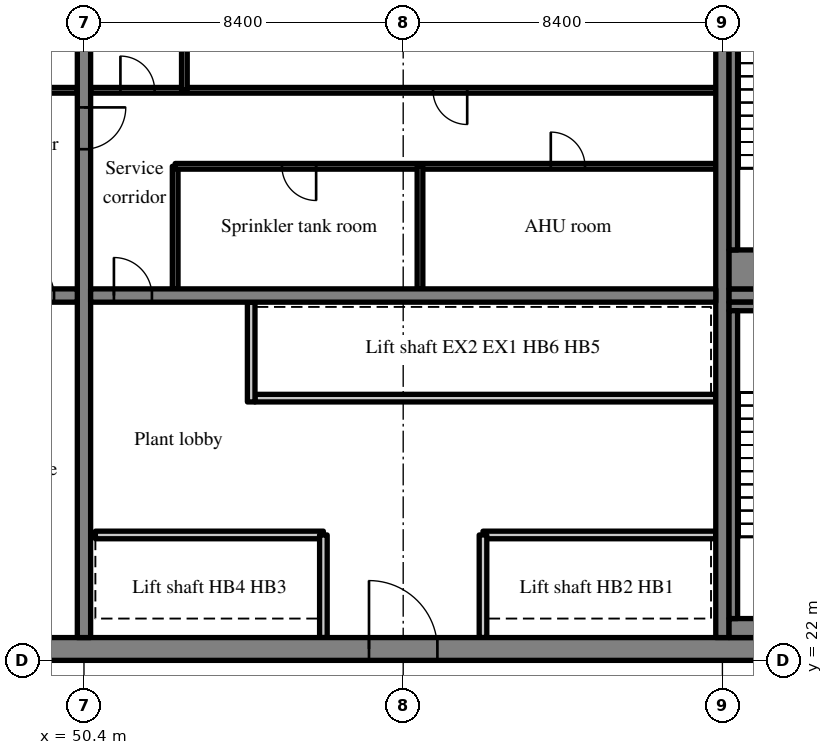
"""IFC4 building model, lengths in metres.
Left out: names, types, materials, properties, quantities, classifications, styles, units other than length and angle.
Written with IfcOpenShell. Run it as: python <this file> out.ifc"""

import sys

from ifc_helpers import new_model, si_unit, direction, frame, frame_2d, origin, place, context, subcontext, project, spatial, rectangle, extrude, source, transform, mapped, element, fill, save


model = new_model("IFC4")
c1 = context("Model", 3, precision=1e-05, world=origin(), true_north=direction((0.0, 1.0)))
c2 = subcontext(c1, "Body", "Model", "MODEL_VIEW")
j1 = project(units=[si_unit("LENGTHUNIT", "METRE"), si_unit("PLANEANGLEUNIT", "RADIAN")], contexts=[c1])
p1 = place(None, origin())
s1 = spatial("IfcSite", under=j1, at=p1, CompositionType="ELEMENT")
p2 = place(p1, origin())
s2 = spatial("IfcBuilding", under=s1, at=p2, CompositionType="ELEMENT")
p3 = place(p2, frame((0.0, 0.0, 206.4)))
s3 = spatial("IfcBuildingStorey", under=s2, at=p3, CompositionType="ELEMENT", Elevation=206.4)
m1 = source(origin(), c2, "Body", "SweptSolid", [
    extrude(rectangle(XDim=50.4, YDim=0.6, at=frame_2d((25.2, 0.0))), origin(), (0.0, 0.0, 1.0), 7.32),
])
p4 = place(p3, frame((25.2, 22.3, 0.0), z_axis=(0.0, 0.0, 1.0), x_axis=(1.0, 0.0, 0.0)))
e1 = element("IfcWall", 1, at=p4, inside=s3, PredefinedType="SHEAR", context=c2, shape_type="MappedRepresentation", body=[
    mapped(m1, transform((0.0, 0.0, 0.0), scale=1.0)),
])
m2 = source(origin(), c2, "Body", "SweptSolid", [
    extrude(rectangle(XDim=1.2, YDim=2.1, at=frame_2d((0.6, 1.05))), frame((0.0, 0.31, 0.0), z_axis=(0.0, -1.0, 0.0), x_axis=(1.0, 0.0, 0.0)), (0.0, 0.0, 1.0), 0.62),
])
p5 = place(p4, frame((22.262, 0.0, 0.0)))
e2 = element("IfcOpeningElement", 2, at=p5, cuts=e1, PredefinedType="OPENING", context=c2, shape_type="MappedRepresentation", body=[
    mapped(m2, transform((0.0, 0.0, 0.0), scale=1.0)),
])
m3 = source(origin(), c2, "Body", "SweptSolid", [
    extrude(rectangle(XDim=0.9, YDim=2.1, at=frame_2d((0.45, 1.05))), frame((0.0, 0.31, 0.0), z_axis=(0.0, -1.0, 0.0), x_axis=(1.0, 0.0, 0.0)), (0.0, 0.0, 1.0), 0.62),
])
p6 = place(p4, frame((17.25, 0.0, 0.0)))
e3 = element("IfcOpeningElement", 3, at=p6, cuts=e1, PredefinedType="OPENING", context=c2, shape_type="MappedRepresentation", body=[
    mapped(m3, transform((0.0, 0.0, 0.0), scale=1.0)),
])
p7 = place(p4, frame((9.656, 0.0, 0.0)))
e4 = element("IfcOpeningElement", 4, at=p7, cuts=e1, PredefinedType="OPENING", context=c2, shape_type="MappedRepresentation", body=[
    mapped(m3, transform((0.0, 0.0, 0.0), scale=1.0)),
])
p8 = place(p4, frame((12.719, 0.0, 0.0)))
e5 = element("IfcOpeningElement", 5, at=p8, cuts=e1, PredefinedType="OPENING", context=c2, shape_type="MappedRepresentation", body=[
    mapped(m3, transform((0.0, 0.0, 0.0), scale=1.0)),
])
m4 = source(origin(), c2, "Body", "SweptSolid", [
    extrude(rectangle(XDim=1.8, YDim=2.1, at=frame_2d((0.9, 1.05))), frame((0.0, 0.31, 0.0), z_axis=(0.0, -1.0, 0.0), x_axis=(1.0, 0.0, 0.0)), (0.0, 0.0, 1.0), 0.62),
])
p9 = place(p4, frame((32.7, 0.0, 0.0)))
e6 = element("IfcOpeningElement", 6, at=p9, cuts=e1, PredefinedType="OPENING", context=c2, shape_type="MappedRepresentation", body=[
    mapped(m4, transform((0.0, 0.0, 0.0), scale=1.0)),
])
p10 = place(p4, frame((6.488, 0.0, 0.0)))
e7 = element("IfcOpeningElement", 7, at=p10, cuts=e1, PredefinedType="OPENING", context=c2, shape_type="MappedRepresentation", body=[
    mapped(m2, transform((0.0, 0.0, 0.0), scale=1.0)),
])
p11 = place(p4, frame((47.925, 0.0, 0.0)))
e8 = element("IfcOpeningElement", 8, at=p11, cuts=e1, PredefinedType="OPENING", context=c2, shape_type="MappedRepresentation", body=[
    mapped(m2, transform((0.0, 0.0, 0.0), scale=1.0)),
])
m5 = source(origin(), c2, "Body", "SweptSolid", [
    extrude(rectangle(XDim=18.8, YDim=0.35, at=frame_2d((9.4, 0.0))), origin(), (0.0, 0.0, 1.0), 7.32),
])
p12 = place(p3, frame((50.4, 22.6, 0.0), z_axis=(0.0, 0.0, 1.0), x_axis=(0.0, 1.0, 0.0)))
e9 = element("IfcWall", 9, at=p12, inside=s3, PredefinedType="SHEAR", context=c2, shape_type="MappedRepresentation", body=[
    mapped(m5, transform((0.0, 0.0, 0.0), scale=1.0)),
])
m6 = source(origin(), c2, "Body", "SweptSolid", [
    extrude(rectangle(XDim=1.1, YDim=2.1, at=frame_2d((0.55, 1.05))), frame((0.0, 0.185, 0.0), z_axis=(0.0, -1.0, 0.0), x_axis=(1.0, 0.0, 0.0)), (0.0, 0.0, 1.0), 0.37),
])
p13 = place(p12, frame((12.85, 0.0, 0.0)))
e10 = element("IfcOpeningElement", 10, at=p13, cuts=e9, PredefinedType="OPENING", context=c2, shape_type="MappedRepresentation", body=[
    mapped(m6, transform((0.0, 0.0, 0.0), scale=1.0)),
])
p14 = place(p3, frame((67.2, 22.6, 0.0), z_axis=(0.0, 0.0, 1.0), x_axis=(0.0, 1.0, 0.0)))
e11 = element("IfcWall", 11, at=p14, inside=s3, PredefinedType="SHEAR", context=c2, shape_type="MappedRepresentation", body=[
    mapped(m5, transform((0.0, 0.0, 0.0), scale=1.0)),
])
m7 = source(origin(), c2, "Body", "SweptSolid", [
    extrude(rectangle(XDim=16.45, YDim=0.35, at=frame_2d((8.225, 0.0))), origin(), (0.0, 0.0, 1.0), 7.32),
])
p15 = place(p3, frame((33.775, 31.6, 0.0), z_axis=(0.0, 0.0, 1.0), x_axis=(1.0, 0.0, 0.0)))
e12 = element("IfcWall", 12, at=p15, inside=s3, PredefinedType="SHEAR", context=c2, shape_type="MappedRepresentation", body=[
    mapped(m7, transform((0.0, 0.0, 0.0), scale=1.0)),
])
m8 = source(origin(), c2, "Body", "SweptSolid", [
    extrude(rectangle(XDim=1.0, YDim=2.1, at=frame_2d((0.5, 1.05))), frame((0.0, 0.185, 0.0), z_axis=(0.0, -1.0, 0.0), x_axis=(1.0, 0.0, 0.0)), (0.0, 0.0, 1.0), 0.37),
])
p16 = place(p15, frame((14.837, 0.0, 0.0)))
e13 = element("IfcOpeningElement", 13, at=p16, cuts=e12, PredefinedType="OPENING", context=c2, shape_type="MappedRepresentation", body=[
    mapped(m8, transform((0.0, 0.0, 0.0), scale=1.0)),
])
m9 = source(origin(), c2, "Body", "SweptSolid", [
    extrude(rectangle(XDim=16.45, YDim=0.35, at=frame_2d((8.225, 0.0))), origin(), (0.0, 0.0, 1.0), 7.32),
])
p17 = place(p3, frame((50.575, 31.6, 0.0), z_axis=(0.0, 0.0, 1.0), x_axis=(1.0, 0.0, 0.0)))
e14 = element("IfcWall", 14, at=p17, inside=s3, PredefinedType="SHEAR", context=c2, shape_type="MappedRepresentation", body=[
    mapped(m9, transform((0.0, 0.0, 0.0), scale=1.0)),
])
p18 = place(p17, frame((0.613, 0.0, 0.0)))
e15 = element("IfcOpeningElement", 15, at=p18, cuts=e14, PredefinedType="OPENING", context=c2, shape_type="MappedRepresentation", body=[
    mapped(m8, transform((0.0, 0.0, 0.0), scale=1.0)),
])
m10 = source(origin(), c2, "Body", "SweptSolid", [
    extrude(rectangle(XDim=7.625, YDim=0.35, at=frame_2d((3.812, 0.0))), origin(), (0.0, 0.0, 1.0), 7.32),
])
p19 = place(p3, frame((67.375, 31.6, 0.0), z_axis=(0.0, 0.0, 1.0), x_axis=(1.0, 0.0, 0.0)))
e16 = element("IfcWall", 16, at=p19, inside=s3, PredefinedType="SHEAR", context=c2, shape_type="MappedRepresentation", body=[
    mapped(m10, transform((0.0, 0.0, 0.0), scale=1.0)),
])
p20 = place(p19, frame((5.8, 0.0, 0.0)))
e17 = element("IfcOpeningElement", 17, at=p20, cuts=e16, PredefinedType="OPENING", context=c2, shape_type="MappedRepresentation", body=[
    mapped(m6, transform((0.0, 0.0, 0.0), scale=1.0)),
])
m11 = source(origin(), c2, "Body", "SweptSolid", [
    extrude(rectangle(XDim=16.45, YDim=0.15, at=frame_2d((8.225, 0.0))), origin(), (0.0, 0.0, 1.0), 7.32),
])
p21 = place(p3, frame((33.775, 37.0, 0.0), z_axis=(0.0, 0.0, 1.0), x_axis=(1.0, 0.0, 0.0)))
e18 = element("IfcWall", 18, at=p21, inside=s3, PredefinedType="PARTITIONING", context=c2, shape_type="MappedRepresentation", body=[
    mapped(m11, transform((0.0, 0.0, 0.0), scale=1.0)),
])
m12 = source(origin(), c2, "Body", "SweptSolid", [
    extrude(rectangle(XDim=0.9, YDim=2.1, at=frame_2d((0.45, 1.05))), frame((0.0, 0.085, 0.0), z_axis=(0.0, -1.0, 0.0), x_axis=(1.0, 0.0, 0.0)), (0.0, 0.0, 1.0), 0.17),
])
p22 = place(p21, frame((0.784, 0.0, 0.0)))
e19 = element("IfcOpeningElement", 19, at=p22, cuts=e18, PredefinedType="OPENING", context=c2, shape_type="MappedRepresentation", body=[
    mapped(m12, transform((0.0, 0.0, 0.0), scale=1.0)),
])
p23 = place(p21, frame((3.663, 0.0, 0.0)))
e20 = element("IfcOpeningElement", 20, at=p23, cuts=e18, PredefinedType="OPENING", context=c2, shape_type="MappedRepresentation", body=[
    mapped(m12, transform((0.0, 0.0, 0.0), scale=1.0)),
])
p24 = place(p21, frame((9.42, 0.0, 0.0)))
e21 = element("IfcOpeningElement", 21, at=p24, cuts=e18, PredefinedType="OPENING", context=c2, shape_type="MappedRepresentation", body=[
    mapped(m12, transform((0.0, 0.0, 0.0), scale=1.0)),
])
p25 = place(p21, frame((14.766, 0.0, 0.0)))
e22 = element("IfcOpeningElement", 22, at=p25, cuts=e18, PredefinedType="OPENING", context=c2, shape_type="MappedRepresentation", body=[
    mapped(m12, transform((0.0, 0.0, 0.0), scale=1.0)),
])
m13 = source(origin(), c2, "Body", "SweptSolid", [
    extrude(rectangle(XDim=6.125, YDim=0.2, at=frame_2d((3.062, 0.0))), origin(), (0.0, 0.0, 1.0), 7.32),
])
p26 = place(p3, frame((67.025, 25.3, 0.0), z_axis=(0.0, 0.0, 1.0), x_axis=(-1.0, 0.0, 0.0)))
e23 = element("IfcWall", 23, at=p26, inside=s3, PredefinedType="SOLIDWALL", context=c2, shape_type="MappedRepresentation", body=[
    mapped(m13, transform((0.0, 0.0, 0.0), scale=1.0)),
])
m14 = source(origin(), c2, "Body", "SweptSolid", [
    extrude(rectangle(XDim=6.0, YDim=0.2, at=frame_2d((3.0, 0.0))), origin(), (0.0, 0.0, 1.0), 7.32),
])
p27 = place(p3, frame((56.7, 25.3, 0.0), z_axis=(0.0, 0.0, 1.0), x_axis=(-1.0, 0.0, 0.0)))
e24 = element("IfcWall", 24, at=p27, inside=s3, PredefinedType="SOLIDWALL", context=c2, shape_type="MappedRepresentation", body=[
    mapped(m14, transform((0.0, 0.0, 0.0), scale=1.0)),
])
m15 = source(origin(), c2, "Body", "SweptSolid", [
    extrude(rectangle(XDim=12.125, YDim=0.2, at=frame_2d((6.062, 0.0))), origin(), (0.0, 0.0, 1.0), 7.32),
])
p28 = place(p3, frame((67.025, 28.9, 0.0), z_axis=(0.0, 0.0, 1.0), x_axis=(-1.0, 0.0, 0.0)))
e25 = element("IfcWall", 25, at=p28, inside=s3, PredefinedType="SOLIDWALL", context=c2, shape_type="MappedRepresentation", body=[
    mapped(m15, transform((0.0, 0.0, 0.0), scale=1.0)),
])
m16 = source(origin(), c2, "Body", "SweptSolid", [
    extrude(rectangle(XDim=2.7, YDim=0.2, at=frame_2d((1.35, 0.0))), origin(), (0.0, 0.0, 1.0), 7.32),
])
for number, where, z_axis, x_axis in (
    (26, (60.9, 22.6, 0.0), (0.0, 0.0, 1.0), (0.0, 1.0, 0.0)),
    (27, (56.7, 22.6, 0.0), (0.0, 0.0, 1.0), (0.0, 1.0, 0.0)),
):
    element("IfcWall", number, at=place(p3, frame(where, z_axis=z_axis, x_axis=x_axis)), inside=s3, PredefinedType="SOLIDWALL", context=c2, shape_type="MappedRepresentation", body=[
        mapped(m16, transform((0.0, 0.0, 0.0), scale=1.0)),
    ])
m17 = source(origin(), c2, "Body", "SweptSolid", [
    extrude(rectangle(XDim=2.625, YDim=0.2, at=frame_2d((1.312, 0.0))), origin(), (0.0, 0.0, 1.0), 7.32),
])
p29 = place(p3, frame((54.8, 28.8, 0.0), z_axis=(0.0, 0.0, 1.0), x_axis=(0.0, 1.0, 0.0)))
e28 = element("IfcWall", 28, at=p29, inside=s3, PredefinedType="SOLIDWALL", context=c2, shape_type="MappedRepresentation", body=[
    mapped(m17, transform((0.0, 0.0, 0.0), scale=1.0)),
])
m18 = source(origin(), c2, "Body", "SweptSolid", [
    extrude(rectangle(XDim=3.225, YDim=0.15, at=frame_2d((1.613, 0.0))), origin(), (0.0, 0.0, 1.0), 7.32),
])
p30 = place(p3, frame((52.8, 31.775, 0.0), z_axis=(0.0, 0.0, 1.0), x_axis=(0.0, 1.0, 0.0)))
e29 = element("IfcWall", 29, at=p30, inside=s3, PredefinedType="PARTITIONING", context=c2, shape_type="MappedRepresentation", body=[
    mapped(m18, transform((0.0, 0.0, 0.0), scale=1.0)),
])
m19 = source(origin(), c2, "Body", "SweptSolid", [
    extrude(rectangle(XDim=14.225, YDim=0.15, at=frame_2d((7.112, 0.0))), origin(), (0.0, 0.0, 1.0), 7.32),
])
p31 = place(p3, frame((67.025, 35.0, 0.0), z_axis=(0.0, 0.0, 1.0), x_axis=(-1.0, 0.0, 0.0)))
e30 = element("IfcWall", 30, at=p31, inside=s3, PredefinedType="PARTITIONING", context=c2, shape_type="MappedRepresentation", body=[
    mapped(m19, transform((0.0, 0.0, 0.0), scale=1.0)),
])
p32 = place(p31, frame((3.441, 0.0, 0.0)))
e31 = element("IfcOpeningElement", 31, at=p32, cuts=e30, PredefinedType="OPENING", context=c2, shape_type="MappedRepresentation", body=[
    mapped(m12, transform((0.0, 0.0, 0.0), scale=1.0)),
])
p33 = place(p31, frame((10.516, 0.0, 0.0)))
e32 = element("IfcOpeningElement", 32, at=p33, cuts=e30, PredefinedType="OPENING", context=c2, shape_type="MappedRepresentation", body=[
    mapped(m12, transform((0.0, 0.0, 0.0), scale=1.0)),
])
m20 = source(origin(), c2, "Body", "SweptSolid", [
    extrude(rectangle(XDim=16.45, YDim=0.15, at=frame_2d((8.225, 0.0))), origin(), (0.0, 0.0, 1.0), 7.32),
])
p34 = place(p3, frame((67.025, 37.0, 0.0), z_axis=(0.0, 0.0, 1.0), x_axis=(-1.0, 0.0, 0.0)))
e33 = element("IfcWall", 33, at=p34, inside=s3, PredefinedType="PARTITIONING", context=c2, shape_type="MappedRepresentation", body=[
    mapped(m20, transform((0.0, 0.0, 0.0), scale=1.0)),
])
p35 = place(p34, frame((6.541, 0.0, 0.0)))
e34 = element("IfcOpeningElement", 34, at=p35, cuts=e33, PredefinedType="OPENING", context=c2, shape_type="MappedRepresentation", body=[
    mapped(m12, transform((0.0, 0.0, 0.0), scale=1.0)),
])
p36 = place(p34, frame((14.766, 0.0, 0.0)))
e35 = element("IfcOpeningElement", 35, at=p36, cuts=e33, PredefinedType="OPENING", context=c2, shape_type="MappedRepresentation", body=[
    mapped(m12, transform((0.0, 0.0, 0.0), scale=1.0)),
])
p37 = place(p3, frame((59.242, 31.775, 0.0), z_axis=(0.0, 0.0, 1.0), x_axis=(0.0, 1.0, 0.0)))
e36 = element("IfcWall", 36, at=p37, inside=s3, PredefinedType="PARTITIONING", context=c2, shape_type="MappedRepresentation", body=[
    mapped(m18, transform((0.0, 0.0, 0.0), scale=1.0)),
])
m21 = source(origin(), c2, "Body", "SweptSolid", [
    extrude(rectangle(XDim=4.4, YDim=0.15, at=frame_2d((2.2, 0.0))), origin(), (0.0, 0.0, 1.0), 7.32),
])
p38 = place(p3, frame((53.042, 37.0, 0.0), z_axis=(0.0, 0.0, 1.0), x_axis=(0.0, 1.0, 0.0)))
e37 = element("IfcWall", 37, at=p38, inside=s3, PredefinedType="PARTITIONING", context=c2, shape_type="MappedRepresentation", body=[
    mapped(m21, transform((0.0, 0.0, 0.0), scale=1.0)),
])
m22 = source(origin(), c2, "Body", "SweptSolid", [
    extrude(rectangle(XDim=4.875, YDim=0.5, at=frame_2d((2.438, 0.0))), origin(), (0.0, 0.0, 1.0), 7.32),
])
p39 = place(p3, frame((67.375, 22.85, 0.0), z_axis=(0.0, 0.0, 1.0), x_axis=(1.0, 0.0, 0.0)))
e38 = element("IfcWall", 38, at=p39, inside=s3, PredefinedType="SOLIDWALL", context=c2, shape_type="MappedRepresentation", body=[
    mapped(m22, transform((0.0, 0.0, 0.0), scale=1.0)),
])
m23 = source(origin(), c2, "Body", "SweptSolid", [
    extrude(rectangle(XDim=4.875, YDim=0.225, at=frame_2d((2.438, 0.0))), origin(), (0.0, 0.0, 1.0), 7.32),
])
p40 = place(p3, frame((67.375, 31.312, 0.0), z_axis=(0.0, 0.0, 1.0), x_axis=(1.0, 0.0, 0.0)))
e39 = element("IfcWall", 39, at=p40, inside=s3, PredefinedType="SOLIDWALL", context=c2, shape_type="MappedRepresentation", body=[
    mapped(m23, transform((0.0, 0.0, 0.0), scale=1.0)),
])
m24 = source(origin(), c2, "Body", "SweptSolid", [
    extrude(rectangle(XDim=8.1, YDim=0.225, at=frame_2d((4.05, 0.0))), origin(), (0.0, 0.0, 1.0), 7.32),
])
p41 = place(p3, frame((67.487, 23.1, 0.0), z_axis=(0.0, 0.0, 1.0), x_axis=(0.0, 1.0, 0.0)))
e40 = element("IfcWall", 40, at=p41, inside=s3, PredefinedType="SOLIDWALL", context=c2, shape_type="MappedRepresentation", body=[
    mapped(m24, transform((0.0, 0.0, 0.0), scale=1.0)),
])
m25 = source(origin(), c2, "Body", "SweptSolid", [
    extrude(rectangle(XDim=4.875, YDim=1.025, at=frame_2d((2.438, 0.0))), origin(), (0.0, 0.0, 1.0), 7.32),
])
p42 = place(p3, frame((67.375, 32.287, 0.0), z_axis=(0.0, 0.0, 1.0), x_axis=(1.0, 0.0, 0.0)))
e41 = element("IfcWall", 41, at=p42, inside=s3, PredefinedType="SOLIDWALL", context=c2, shape_type="MappedRepresentation", body=[
    mapped(m25, transform((0.0, 0.0, 0.0), scale=1.0)),
])
p43 = place(p3, frame((67.487, 32.8, 0.0), z_axis=(0.0, 0.0, 1.0), x_axis=(0.0, 1.0, 0.0)))
e42 = element("IfcWall", 42, at=p43, inside=s3, PredefinedType="SOLIDWALL", context=c2, shape_type="MappedRepresentation", body=[
    mapped(m24, transform((0.0, 0.0, 0.0), scale=1.0)),
])
m26 = source(origin(), c2, "Body", "SweptSolid", [
    extrude(rectangle(XDim=1.0, YDim=2.1, at=frame_2d((0.5, 1.05))), frame((0.0, 0.025, 0.0), z_axis=(0.0, -1.0, 0.0), x_axis=(1.0, 0.0, 0.0)), (0.0, 0.0, 1.0), 0.05),
])
p44 = place(p16, origin())
e43 = element("IfcDoor", 43, at=p44, inside=s3, OperationType="SINGLE_SWING_LEFT", PredefinedType="DOOR", context=c2, shape_type="MappedRepresentation", body=[
    mapped(m26, transform((0.0, 0.0, 0.0), scale=1.0)),
])
fill(e13, e43)
m27 = source(origin(), c2, "Body", "SweptSolid", [
    extrude(rectangle(XDim=1.8, YDim=2.1, at=frame_2d((0.9, 1.05))), frame((0.0, 0.225, 0.0), z_axis=(0.0, -1.0, 0.0), x_axis=(1.0, 0.0, 0.0)), (0.0, 0.0, 1.0), 0.05),
])
p45 = place(p9, origin())
e44 = element("IfcDoor", 44, at=p45, inside=s3, OperationType="DOUBLE_DOOR_SINGLE_SWING", PredefinedType="DOOR", context=c2, shape_type="MappedRepresentation", body=[
    mapped(m27, transform((0.0, 0.0, 0.0), scale=1.0)),
])
fill(e6, e44)
p46 = place(p18, origin())
e45 = element("IfcDoor", 45, at=p46, inside=s3, OperationType="SINGLE_SWING_LEFT", PredefinedType="DOOR", context=c2, shape_type="MappedRepresentation", body=[
    mapped(m26, transform((0.0, 0.0, 0.0), scale=1.0)),
])
fill(e15, e45)
m28 = source(origin(), c2, "Body", "SweptSolid", [
    extrude(rectangle(XDim=0.9, YDim=2.1, at=frame_2d((0.45, 1.05))), frame((0.0, 0.025, 0.0), z_axis=(0.0, -1.0, 0.0), x_axis=(1.0, 0.0, 0.0)), (0.0, 0.0, 1.0), 0.05),
])
p47 = place(p32, origin())
e46 = element("IfcDoor", 46, at=p47, inside=s3, OperationType="SINGLE_SWING_RIGHT", PredefinedType="DOOR", context=c2, shape_type="MappedRepresentation", body=[
    mapped(m28, transform((0.0, 0.0, 0.0), scale=1.0)),
])
fill(e31, e46)
p48 = place(p33, origin())
e47 = element("IfcDoor", 47, at=p48, inside=s3, OperationType="SINGLE_SWING_LEFT", PredefinedType="DOOR", context=c2, shape_type="MappedRepresentation", body=[
    mapped(m28, transform((0.0, 0.0, 0.0), scale=1.0)),
])
fill(e32, e47)
p49 = place(p35, origin())
e48 = element("IfcDoor", 48, at=p49, inside=s3, OperationType="SINGLE_SWING_LEFT", PredefinedType="DOOR", context=c2, shape_type="MappedRepresentation", body=[
    mapped(m28, transform((0.0, 0.0, 0.0), scale=1.0)),
])
fill(e34, e48)
p50 = place(p36, origin())
e49 = element("IfcDoor", 49, at=p50, inside=s3, OperationType="SINGLE_SWING_RIGHT", PredefinedType="DOOR", context=c2, shape_type="MappedRepresentation", body=[
    mapped(m28, transform((0.0, 0.0, 0.0), scale=1.0)),
])
fill(e35, e49)
m29 = source(origin(), c2, "Body", "SweptSolid", [
    extrude(rectangle(XDim=1.1, YDim=2.1, at=frame_2d((0.55, 1.05))), frame((0.0, 0.025, 0.0), z_axis=(0.0, -1.0, 0.0), x_axis=(1.0, 0.0, 0.0)), (0.0, 0.0, 1.0), 0.05),
])
p51 = place(p13, origin())
e50 = element("IfcDoor", 50, at=p51, inside=s3, OperationType="SINGLE_SWING_RIGHT", PredefinedType="DOOR", context=c2, shape_type="MappedRepresentation", body=[
    mapped(m29, transform((0.0, 0.0, 0.0), scale=1.0)),
])
fill(e10, e50)
save(model, sys.argv[1])
